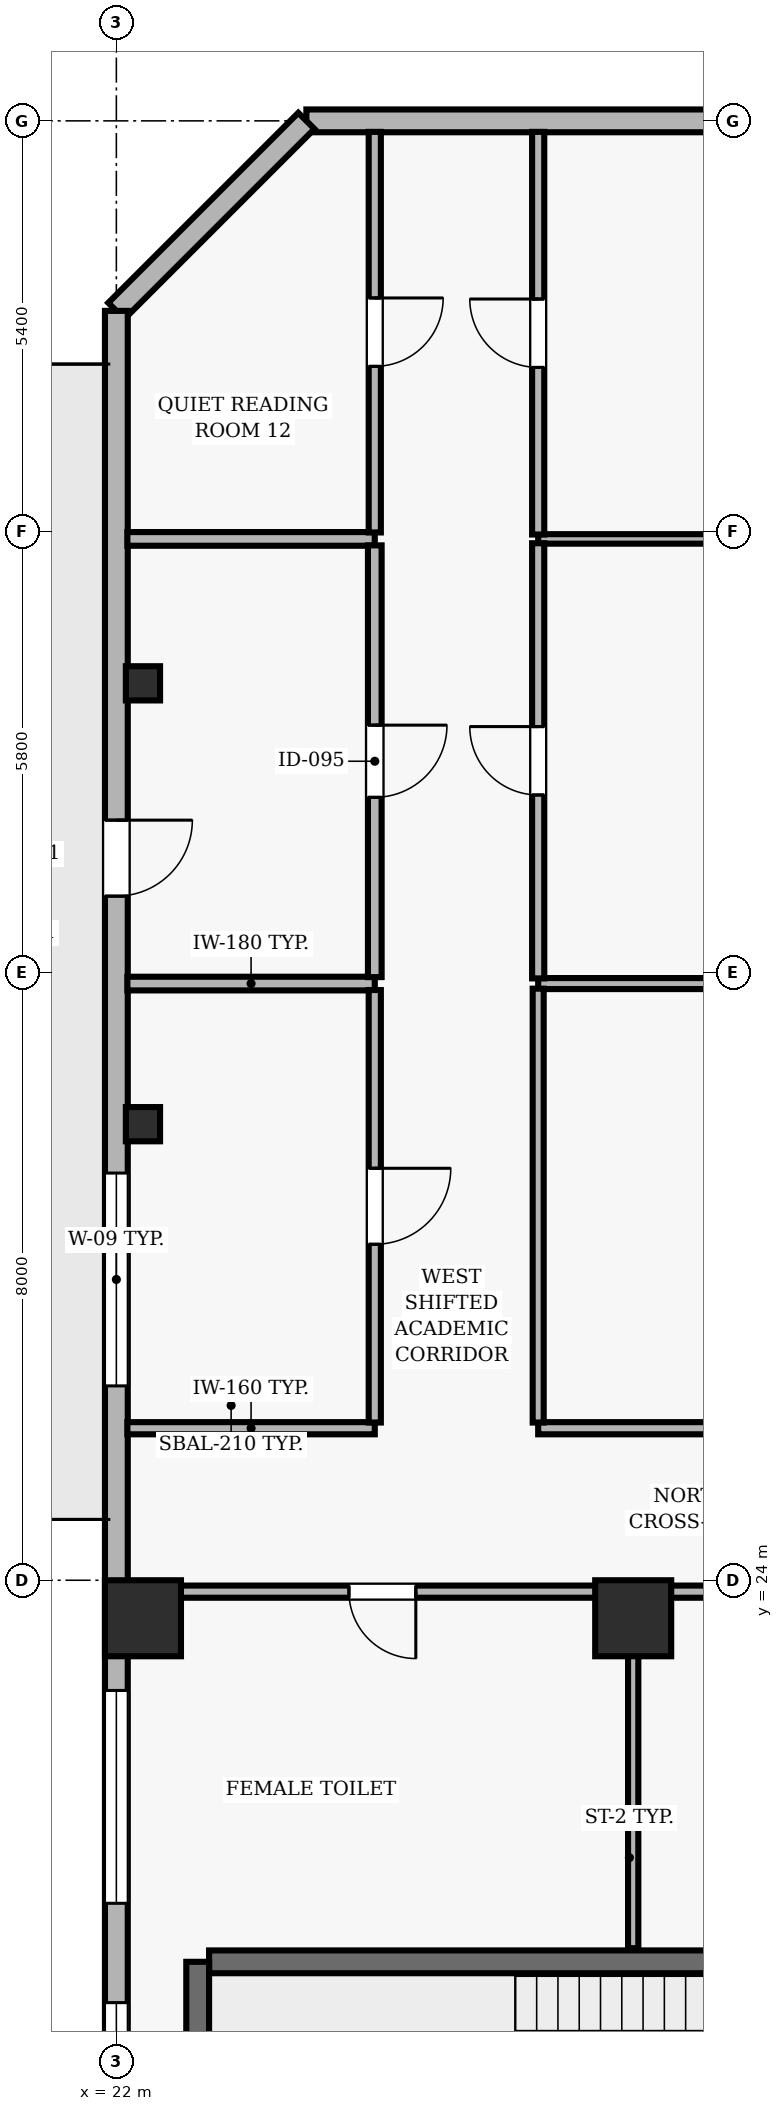
"""IFC4 building model, lengths in metres.
Left out: names, types, materials, properties, quantities, classifications, styles, units other than length and angle.
Written with IfcOpenShell. Run it as: python <this file> out.ifc"""

import sys

from ifc_helpers import new_model, si_unit, direction, frame, frame_2d, origin, origin_2d, place, context, subcontext, project, spatial, rectangle, hollow_rectangle, extrude, element, fill, save


model = new_model("IFC4")
c1 = context("Model", 3, precision=1e-05, world=origin(), true_north=direction((0.0, 1.0)))
c2 = subcontext(c1, "Body", "Model", "MODEL_VIEW")
j1 = project(units=[si_unit("LENGTHUNIT", "METRE"), si_unit("PLANEANGLEUNIT", "RADIAN")], contexts=[c1])
p1 = place(None, origin())
s1 = spatial("IfcSite", under=j1, at=p1, CompositionType="ELEMENT")
p2 = place(p1, origin())
s2 = spatial("IfcBuilding", under=s1, at=p2, CompositionType="ELEMENT")
p3 = place(p2, frame((0.0, 0.0, 183.6)))
s3 = spatial("IfcBuildingStorey", under=s2, at=p3, CompositionType="ELEMENT", Elevation=183.6)
for number, where, z_axis, x_axis in (
    (1, (22.35, 23.5, 0.0), (0.0, 0.0, 1.0), (1.0, 0.0, 0.0)),
    (2, (28.8, 23.5, 0.0), (0.0, 0.0, 1.0), (1.0, 0.0, 0.0)),
):
    element("IfcColumn", number, at=place(p3, frame(where, z_axis=z_axis, x_axis=x_axis)), inside=s3, PredefinedType="COLUMN", context=c2, shape_type="SweptSolid", body=[
        extrude(rectangle(XDim=1.0, YDim=1.0, at=origin_2d()), origin(), (0.0, 0.0, 1.0), 3.9),
    ])
for number, where, z_axis, x_axis in (
    (3, (22.35, 30.0, 0.0), (0.0, 0.0, 1.0), (1.0, 0.0, 0.0)),
    (4, (22.35, 35.8, 0.0), (0.0, 0.0, 1.0), (1.0, 0.0, 0.0)),
):
    element("IfcColumn", number, at=place(p3, frame(where, z_axis=z_axis, x_axis=x_axis)), inside=s3, PredefinedType="COLUMN", context=c2, shape_type="SweptSolid", body=[
        extrude(hollow_rectangle(XDim=0.45, YDim=0.45, WallThickness=0.02, at=origin_2d()), origin(), (0.0, 0.0, 1.0), 3.9),
    ])
p4 = place(p3, frame((35.5, 43.2, 0.0), z_axis=(0.0, 0.0, 1.0), x_axis=(-1.0, 0.0, 0.0)))
e5 = element("IfcWall", 5, at=p4, inside=s3, PredefinedType="SOLIDWALL", context=c2, shape_type="SweptSolid", body=[
    extrude(rectangle(XDim=11.0, YDim=0.3, at=frame_2d((5.5, 0.0))), origin(), (0.0, 0.0, 1.0), 3.69),
])
p5 = place(p4, frame((1.85, 0.0, 0.9)))
e6 = element("IfcOpeningElement", 6, at=p5, cuts=e5, PredefinedType="OPENING", context=c2, shape_type="SweptSolid", body=[
    extrude(rectangle(XDim=1.8, YDim=1.8, at=frame_2d((0.9, 0.9))), frame((0.0, 0.16, 0.0), z_axis=(0.0, -1.0, 0.0), x_axis=(1.0, 0.0, 0.0)), (0.0, 0.0, 1.0), 0.32),
])
p6 = place(p3, frame((24.5, 43.2, 0.0), z_axis=(0.0, 0.0, 1.0), x_axis=(-0.707106781187, -0.707106781187, 0.0)))
e7 = element("IfcWall", 7, at=p6, inside=s3, PredefinedType="SOLIDWALL", context=c2, shape_type="SweptSolid", body=[
    extrude(rectangle(XDim=3.536, YDim=0.3, at=frame_2d((1.768, 0.0))), origin(), (0.0, 0.0, 1.0), 3.69),
])
p7 = place(p3, frame((22.0, 40.7, 0.0), z_axis=(0.0, 0.0, 1.0), x_axis=(0.0, -1.0, 0.0)))
e8 = element("IfcWall", 8, at=p7, inside=s3, PredefinedType="SOLIDWALL", context=c2, shape_type="SweptSolid", body=[
    extrude(rectangle(XDim=38.2, YDim=0.3, at=frame_2d((19.1, 0.0))), origin(), (0.0, 0.0, 1.0), 3.69),
])
p8 = place(p7, frame((6.7, 0.0, 0.0)))
e9 = element("IfcOpeningElement", 9, at=p8, cuts=e8, PredefinedType="OPENING", context=c2, shape_type="SweptSolid", body=[
    extrude(rectangle(XDim=1.0, YDim=2.2, at=frame_2d((0.5, 1.1))), frame((0.0, 0.16, 0.0), z_axis=(0.0, -1.0, 0.0), x_axis=(1.0, 0.0, 0.0)), (0.0, 0.0, 1.0), 0.32),
])
p9 = place(p7, frame((11.343, 0.0, 0.9)))
e10 = element("IfcOpeningElement", 10, at=p9, cuts=e8, PredefinedType="OPENING", context=c2, shape_type="SweptSolid", body=[
    extrude(rectangle(XDim=2.8, YDim=1.8, at=frame_2d((1.4, 0.9))), frame((0.0, 0.16, 0.0), z_axis=(0.0, -1.0, 0.0), x_axis=(1.0, 0.0, 0.0)), (0.0, 0.0, 1.0), 0.32),
])
p10 = place(p7, frame((18.15, 0.0, 0.9)))
e11 = element("IfcOpeningElement", 11, at=p10, cuts=e8, PredefinedType="OPENING", context=c2, shape_type="SweptSolid", body=[
    extrude(rectangle(XDim=2.8, YDim=1.8, at=frame_2d((1.4, 0.9))), frame((0.0, 0.16, 0.0), z_axis=(0.0, -1.0, 0.0), x_axis=(1.0, 0.0, 0.0)), (0.0, 0.0, 1.0), 0.32),
])
p11 = place(p7, frame((22.257, 0.0, 0.9)))
e12 = element("IfcOpeningElement", 12, at=p11, cuts=e8, PredefinedType="OPENING", context=c2, shape_type="SweptSolid", body=[
    extrude(rectangle(XDim=2.8, YDim=1.8, at=frame_2d((1.4, 0.9))), frame((0.0, 0.16, 0.0), z_axis=(0.0, -1.0, 0.0), x_axis=(1.0, 0.0, 0.0)), (0.0, 0.0, 1.0), 0.32),
])
p12 = place(p7, frame((28.614, 0.0, 0.9)))
e13 = element("IfcOpeningElement", 13, at=p12, cuts=e8, PredefinedType="OPENING", context=c2, shape_type="SweptSolid", body=[
    extrude(rectangle(XDim=2.8, YDim=1.8, at=frame_2d((1.4, 0.9))), frame((0.0, 0.16, 0.0), z_axis=(0.0, -1.0, 0.0), x_axis=(1.0, 0.0, 0.0)), (0.0, 0.0, 1.0), 0.32),
])
p13 = place(p3, frame((31.58, 18.98, 0.0), z_axis=(0.0, 0.0, 1.0), x_axis=(-1.0, 0.0, 0.0)))
e14 = element("IfcWall", 14, at=p13, inside=s3, PredefinedType="SHEAR", context=c2, shape_type="SweptSolid", body=[
    extrude(rectangle(XDim=8.36, YDim=0.3, at=frame_2d((4.18, 0.0))), origin(), (0.0, 0.0, 1.0), 3.69),
])
p14 = place(p3, frame((23.07, 18.98, 0.0), z_axis=(0.0, 0.0, 1.0), x_axis=(0.0, -1.0, 0.0)))
e15 = element("IfcWall", 15, at=p14, inside=s3, PredefinedType="SHEAR", context=c2, shape_type="SweptSolid", body=[
    extrude(rectangle(XDim=3.51, YDim=0.3, at=frame_2d((1.755, 0.0))), origin(), (0.0, 0.0, 1.0), 3.69),
])
p15 = place(p3, frame((25.4, 26.0, 0.0), z_axis=(0.0, 0.0, 1.0), x_axis=(-1.0, 0.0, 0.0)))
e16 = element("IfcWall", 16, at=p15, inside=s3, PredefinedType="PARTITIONING", context=c2, shape_type="SweptSolid", body=[
    extrude(rectangle(XDim=3.255, YDim=0.16, at=frame_2d((1.627, 0.0))), origin(), (0.0, 0.0, 1.0), 3.69),
])
for number, where, z_axis, x_axis in (
    (17, (25.4, 31.85, 0.0), (0.0, 0.0, 1.0), (-1.0, 0.0, 0.0)),
    (18, (25.4, 37.7, 0.0), (0.0, 0.0, 1.0), (-1.0, 0.0, 0.0)),
):
    element("IfcWall", number, at=place(p3, frame(where, z_axis=z_axis, x_axis=x_axis)), inside=s3, PredefinedType="PARTITIONING", context=c2, shape_type="SweptSolid", body=[
        extrude(rectangle(XDim=3.255, YDim=0.18, at=frame_2d((1.627, 0.0))), origin(), (0.0, 0.0, 1.0), 3.69),
    ])
p16 = place(p3, frame((28.8, 23.85, 0.0), z_axis=(0.0, 0.0, 1.0), x_axis=(-1.0, 0.0, 0.0)))
e19 = element("IfcWall", 19, at=p16, inside=s3, PredefinedType="PARTITIONING", context=c2, shape_type="SweptSolid", body=[
    extrude(rectangle(XDim=6.6, YDim=0.16, at=frame_2d((3.3, 0.0))), origin(), (0.0, 0.0, 1.0), 3.139),
])
p17 = place(p16, frame((2.86, 0.0, 0.0)))
e20 = element("IfcOpeningElement", 20, at=p17, cuts=e19, PredefinedType="OPENING", context=c2, shape_type="SweptSolid", body=[
    extrude(rectangle(XDim=0.88, YDim=2.1, at=frame_2d((0.44, 1.05))), frame((0.0, 0.09, 0.0), z_axis=(0.0, -1.0, 0.0), x_axis=(1.0, 0.0, 0.0)), (0.0, 0.0, 1.0), 0.18),
])
p18 = place(p3, frame((31.65, 23.85, 0.0), z_axis=(0.0, 0.0, 1.0), x_axis=(-1.0, 0.0, 0.0)))
e21 = element("IfcWall", 21, at=p18, inside=s3, PredefinedType="PARTITIONING", context=c2, shape_type="SweptSolid", body=[
    extrude(rectangle(XDim=2.85, YDim=0.16, at=frame_2d((1.425, 0.0))), origin(), (0.0, 0.0, 1.0), 3.139),
])
p19 = place(p3, frame((37.85, 26.0, 0.0), z_axis=(0.0, 0.0, 1.0), x_axis=(-1.0, 0.0, 0.0)))
e22 = element("IfcWall", 22, at=p19, inside=s3, PredefinedType="PARTITIONING", context=c2, shape_type="SweptSolid", body=[
    extrude(rectangle(XDim=10.3, YDim=0.16, at=frame_2d((5.15, 0.0))), origin(), (0.0, 0.0, 1.0), 3.69),
])
p20 = place(p19, frame((4.6, 0.0, 0.0)))
e23 = element("IfcOpeningElement", 23, at=p20, cuts=e22, PredefinedType="OPENING", context=c2, shape_type="SweptSolid", body=[
    extrude(rectangle(XDim=1.1, YDim=2.15, at=frame_2d((0.55, 1.075))), frame((0.0, 0.09, 0.0), z_axis=(0.0, -1.0, 0.0), x_axis=(1.0, 0.0, 0.0)), (0.0, 0.0, 1.0), 0.18),
])
p21 = place(p3, frame((37.85, 31.85, 0.0), z_axis=(0.0, 0.0, 1.0), x_axis=(-1.0, 0.0, 0.0)))
e24 = element("IfcWall", 24, at=p21, inside=s3, PredefinedType="PARTITIONING", context=c2, shape_type="SweptSolid", body=[
    extrude(rectangle(XDim=10.3, YDim=0.145, at=frame_2d((5.15, 0.0))), origin(), (0.0, 0.0, 1.0), 3.69),
])
p22 = place(p3, frame((37.85, 37.7, 0.0), z_axis=(0.0, 0.0, 1.0), x_axis=(-1.0, 0.0, 0.0)))
e25 = element("IfcWall", 25, at=p22, inside=s3, PredefinedType="PARTITIONING", context=c2, shape_type="SweptSolid", body=[
    extrude(rectangle(XDim=10.3, YDim=0.125, at=frame_2d((5.15, 0.0))), origin(), (0.0, 0.0, 1.0), 3.69),
])
p23 = place(p3, frame((25.4, 31.765, 0.0), z_axis=(0.0, 0.0, 1.0), x_axis=(0.0, -1.0, 0.0)))
e26 = element("IfcWall", 26, at=p23, inside=s3, PredefinedType="PARTITIONING", context=c2, shape_type="SweptSolid", body=[
    extrude(rectangle(XDim=5.69, YDim=0.16, at=frame_2d((2.845, 0.0))), origin(), (0.0, 0.0, 1.0), 3.69),
])
p24 = place(p23, frame((2.345, 0.0, 0.0)))
e27 = element("IfcOpeningElement", 27, at=p24, cuts=e26, PredefinedType="OPENING", context=c2, shape_type="SweptSolid", body=[
    extrude(rectangle(XDim=1.0, YDim=2.1, at=frame_2d((0.5, 1.05))), frame((0.0, 0.09, 0.0), z_axis=(0.0, -1.0, 0.0), x_axis=(1.0, 0.0, 0.0)), (0.0, 0.0, 1.0), 0.18),
])
p25 = place(p3, frame((25.4, 37.615, 0.0), z_axis=(0.0, 0.0, 1.0), x_axis=(0.0, -1.0, 0.0)))
e28 = element("IfcWall", 28, at=p25, inside=s3, PredefinedType="PARTITIONING", context=c2, shape_type="SweptSolid", body=[
    extrude(rectangle(XDim=5.68, YDim=0.18, at=frame_2d((2.84, 0.0))), origin(), (0.0, 0.0, 1.0), 3.69),
])
p26 = place(p25, frame((2.365, 0.0, 0.0)))
e29 = element("IfcOpeningElement", 29, at=p26, cuts=e28, PredefinedType="OPENING", context=c2, shape_type="SweptSolid", body=[
    extrude(rectangle(XDim=0.95, YDim=2.1, at=frame_2d((0.475, 1.05))), frame((0.0, 0.1, 0.0), z_axis=(0.0, -1.0, 0.0), x_axis=(1.0, 0.0, 0.0)), (0.0, 0.0, 1.0), 0.2),
])
p27 = place(p3, frame((25.4, 43.055, 0.0), z_axis=(0.0, 0.0, 1.0), x_axis=(0.0, -1.0, 0.0)))
e30 = element("IfcWall", 30, at=p27, inside=s3, PredefinedType="PARTITIONING", context=c2, shape_type="SweptSolid", body=[
    extrude(rectangle(XDim=5.27, YDim=0.16, at=frame_2d((2.635, 0.0))), origin(), (0.0, 0.0, 1.0), 3.69),
])
p28 = place(p27, frame((2.185, 0.0, 0.0)))
e31 = element("IfcOpeningElement", 31, at=p28, cuts=e30, PredefinedType="OPENING", context=c2, shape_type="SweptSolid", body=[
    extrude(rectangle(XDim=0.9, YDim=2.1, at=frame_2d((0.45, 1.05))), frame((0.0, 0.09, 0.0), z_axis=(0.0, -1.0, 0.0), x_axis=(1.0, 0.0, 0.0)), (0.0, 0.0, 1.0), 0.18),
])
p29 = place(p3, frame((27.55, 26.075, 0.0), z_axis=(0.0, 0.0, 1.0), x_axis=(0.0, 1.0, 0.0)))
e32 = element("IfcWall", 32, at=p29, inside=s3, PredefinedType="PARTITIONING", context=c2, shape_type="SweptSolid", body=[
    extrude(rectangle(XDim=5.708, YDim=0.145, at=frame_2d((2.854, 0.0))), origin(), (0.0, 0.0, 1.0), 3.69),
])
p30 = place(p3, frame((27.55, 31.918, 0.0), z_axis=(0.0, 0.0, 1.0), x_axis=(0.0, 1.0, 0.0)))
e33 = element("IfcWall", 33, at=p30, inside=s3, PredefinedType="PARTITIONING", context=c2, shape_type="SweptSolid", body=[
    extrude(rectangle(XDim=5.725, YDim=0.16, at=frame_2d((2.863, 0.0))), origin(), (0.0, 0.0, 1.0), 3.69),
])
p31 = place(p30, frame((2.413, 0.0, 0.0)))
e34 = element("IfcOpeningElement", 34, at=p31, cuts=e33, PredefinedType="OPENING", context=c2, shape_type="SweptSolid", body=[
    extrude(rectangle(XDim=0.9, YDim=2.1, at=frame_2d((0.45, 1.05))), frame((0.0, 0.09, 0.0), z_axis=(0.0, -1.0, 0.0), x_axis=(1.0, 0.0, 0.0)), (0.0, 0.0, 1.0), 0.18),
])
p32 = place(p3, frame((27.55, 37.758, 0.0), z_axis=(0.0, 0.0, 1.0), x_axis=(0.0, 1.0, 0.0)))
e35 = element("IfcWall", 35, at=p32, inside=s3, PredefinedType="PARTITIONING", context=c2, shape_type="SweptSolid", body=[
    extrude(rectangle(XDim=5.297, YDim=0.16, at=frame_2d((2.648, 0.0))), origin(), (0.0, 0.0, 1.0), 3.69),
])
p33 = place(p32, frame((2.198, 0.0, 0.0)))
e36 = element("IfcOpeningElement", 36, at=p33, cuts=e35, PredefinedType="OPENING", context=c2, shape_type="SweptSolid", body=[
    extrude(rectangle(XDim=0.9, YDim=2.1, at=frame_2d((0.45, 1.05))), frame((0.0, 0.09, 0.0), z_axis=(0.0, -1.0, 0.0), x_axis=(1.0, 0.0, 0.0)), (0.0, 0.0, 1.0), 0.18),
])
p34 = place(p3, frame((28.8, 23.775, 0.0), z_axis=(0.0, 0.0, 1.0), x_axis=(0.0, -1.0, 0.0)))
e37 = element("IfcWall", 37, at=p34, inside=s3, PredefinedType="PARTITIONING", context=c2, shape_type="SweptSolid", body=[
    extrude(rectangle(XDim=4.615, YDim=0.135, at=frame_2d((2.308, 0.0))), origin(), (0.0, 0.0, 1.0), 3.69),
])
p35 = place(p8, origin())
e38 = element("IfcDoor", 38, at=p35, inside=s3, OperationType="SINGLE_SWING_LEFT", PredefinedType="DOOR", context=c2, shape_type="SweptSolid", body=[
    extrude(rectangle(XDim=1.0, YDim=2.2, at=frame_2d((0.5, 1.1))), frame((0.0, 0.025, 0.0), z_axis=(0.0, -1.0, 0.0), x_axis=(1.0, 0.0, 0.0)), (0.0, 0.0, 1.0), 0.05),
])
fill(e9, e38)
p36 = place(p9, origin())
e39 = element("IfcWindow", 39, at=p36, inside=s3, PartitioningType="SINGLE_PANEL", PredefinedType="WINDOW", context=c2, shape_type="SweptSolid", body=[
    extrude(rectangle(XDim=2.8, YDim=1.8, at=frame_2d((1.4, 0.9))), frame((0.0, 0.03, 0.0), z_axis=(0.0, -1.0, 0.0), x_axis=(1.0, 0.0, 0.0)), (0.0, 0.0, 1.0), 0.06),
])
fill(e10, e39)
p37 = place(p10, origin())
e40 = element("IfcWindow", 40, at=p37, inside=s3, PartitioningType="SINGLE_PANEL", PredefinedType="WINDOW", context=c2, shape_type="SweptSolid", body=[
    extrude(rectangle(XDim=2.8, YDim=1.8, at=frame_2d((1.4, 0.9))), frame((0.0, 0.03, 0.0), z_axis=(0.0, -1.0, 0.0), x_axis=(1.0, 0.0, 0.0)), (0.0, 0.0, 1.0), 0.06),
])
fill(e11, e40)
p38 = place(p11, origin())
e41 = element("IfcWindow", 41, at=p38, inside=s3, PartitioningType="SINGLE_PANEL", PredefinedType="WINDOW", context=c2, shape_type="SweptSolid", body=[
    extrude(rectangle(XDim=2.8, YDim=1.8, at=frame_2d((1.4, 0.9))), frame((0.0, 0.03, 0.0), z_axis=(0.0, -1.0, 0.0), x_axis=(1.0, 0.0, 0.0)), (0.0, 0.0, 1.0), 0.06),
])
fill(e12, e41)
p39 = place(p17, origin())
e42 = element("IfcDoor", 42, at=p39, inside=s3, OperationType="SINGLE_SWING_LEFT", PredefinedType="DOOR", context=c2, shape_type="SweptSolid", body=[
    extrude(rectangle(XDim=0.88, YDim=2.1, at=frame_2d((0.44, 1.05))), frame((0.0, 0.025, 0.0), z_axis=(0.0, -1.0, 0.0), x_axis=(1.0, 0.0, 0.0)), (0.0, 0.0, 1.0), 0.05),
])
fill(e20, e42)
p40 = place(p24, origin())
e43 = element("IfcDoor", 43, at=p40, inside=s3, OperationType="SINGLE_SWING_LEFT", PredefinedType="DOOR", context=c2, shape_type="SweptSolid", body=[
    extrude(rectangle(XDim=1.0, YDim=2.1, at=frame_2d((0.5, 1.05))), frame((0.0, 0.025, 0.0), z_axis=(0.0, -1.0, 0.0), x_axis=(1.0, 0.0, 0.0)), (0.0, 0.0, 1.0), 0.05),
])
fill(e27, e43)
p41 = place(p26, origin())
e44 = element("IfcDoor", 44, at=p41, inside=s3, OperationType="SINGLE_SWING_LEFT", PredefinedType="DOOR", context=c2, shape_type="SweptSolid", body=[
    extrude(rectangle(XDim=0.95, YDim=2.1, at=frame_2d((0.475, 1.05))), frame((0.0, 0.025, 0.0), z_axis=(0.0, -1.0, 0.0), x_axis=(1.0, 0.0, 0.0)), (0.0, 0.0, 1.0), 0.05),
])
fill(e29, e44)
p42 = place(p31, origin())
e45 = element("IfcDoor", 45, at=p42, inside=s3, OperationType="SINGLE_SWING_RIGHT", PredefinedType="DOOR", context=c2, shape_type="SweptSolid", body=[
    extrude(rectangle(XDim=0.9, YDim=2.1, at=frame_2d((0.45, 1.05))), frame((0.0, 0.025, 0.0), z_axis=(0.0, -1.0, 0.0), x_axis=(1.0, 0.0, 0.0)), (0.0, 0.0, 1.0), 0.05),
])
fill(e34, e45)
p43 = place(p28, origin())
e46 = element("IfcDoor", 46, at=p43, inside=s3, OperationType="SINGLE_SWING_LEFT", PredefinedType="DOOR", context=c2, shape_type="SweptSolid", body=[
    extrude(rectangle(XDim=0.9, YDim=2.1, at=frame_2d((0.45, 1.05))), frame((0.0, 0.025, 0.0), z_axis=(0.0, -1.0, 0.0), x_axis=(1.0, 0.0, 0.0)), (0.0, 0.0, 1.0), 0.05),
])
fill(e31, e46)
p44 = place(p33, origin())
e47 = element("IfcDoor", 47, at=p44, inside=s3, OperationType="SINGLE_SWING_RIGHT", PredefinedType="DOOR", context=c2, shape_type="SweptSolid", body=[
    extrude(rectangle(XDim=0.9, YDim=2.1, at=frame_2d((0.45, 1.05))), frame((0.0, 0.025, 0.0), z_axis=(0.0, -1.0, 0.0), x_axis=(1.0, 0.0, 0.0)), (0.0, 0.0, 1.0), 0.05),
])
fill(e36, e47)
save(model, sys.argv[1])
